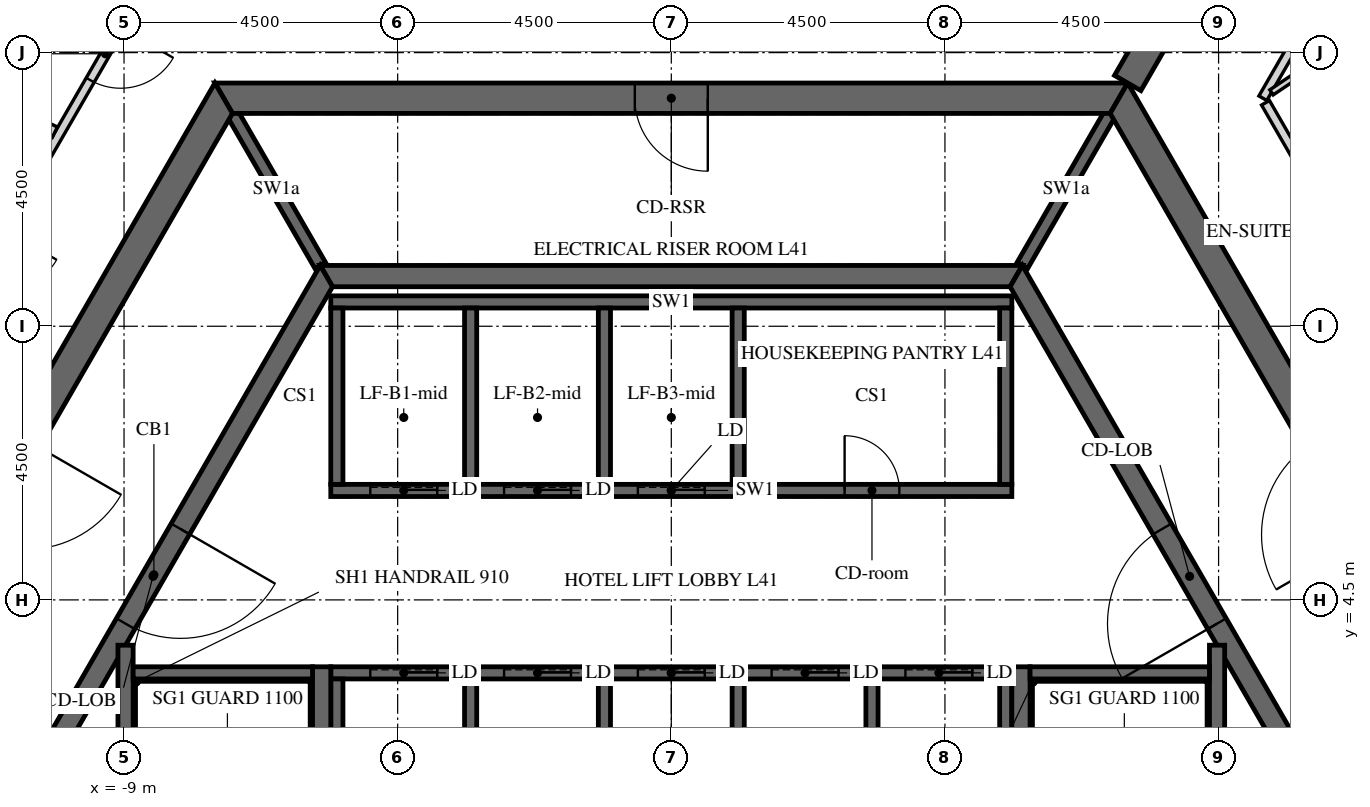
"""IFC4 building model, lengths in metres.
Left out: names, types, materials, properties, quantities, classifications, styles, units other than length and angle.
Written with IfcOpenShell. Run it as: python <this file> out.ifc"""

import sys

from ifc_helpers import new_model, si_unit, direction, frame, frame_2d, origin, place, context, subcontext, project, spatial, polyline, rectangle, outline, extrude, element, fill, save


model = new_model("IFC4")
c1 = context("Model", 3, precision=1e-05, world=origin(), true_north=direction((0.0, 1.0)))
c2 = subcontext(c1, "Body", "Model", "MODEL_VIEW")
j1 = project(units=[si_unit("LENGTHUNIT", "METRE"), si_unit("PLANEANGLEUNIT", "RADIAN")], contexts=[c1])
p1 = place(None, origin())
s1 = spatial("IfcSite", under=j1, at=p1, CompositionType="ELEMENT")
p2 = place(p1, origin())
s2 = spatial("IfcBuilding", under=s1, at=p2, CompositionType="ELEMENT")
p3 = place(p2, frame((0.0, 0.0, 176.1)))
s3 = spatial("IfcBuildingStorey", under=s2, at=p3, CompositionType="ELEMENT", Elevation=176.1)
p4 = place(p3, frame((-7.361, 12.75, -0.15), z_axis=(0.0, 0.0, 1.0), x_axis=(-0.50000571537, -0.866022103989, 0.0)))
e1 = element("IfcWall", 1, at=p4, inside=s3, PredefinedType="SHEAR", context=c2, shape_type="SweptSolid", body=[
    extrude(outline(polyline([(-0.144, -0.25), (14.867, -0.25), (14.578, 0.25), (0.144, 0.25), (-0.144, -0.25)])), origin(), (0.0, 0.0, 1.0), 3.9),
])
p5 = place(p4, frame((6.49, 0.0, 0.15)))
e2 = element("IfcOpeningElement", 2, at=p5, cuts=e1, PredefinedType="OPENING", context=c2, shape_type="SweptSolid", body=[
    extrude(rectangle(XDim=1.8, YDim=2.4, at=frame_2d((0.9, 1.2))), frame((0.0, 0.26, 0.0), z_axis=(0.0, -1.0, 0.0), x_axis=(1.0, 0.0, 0.0)), (0.0, 0.0, 1.0), 0.52),
])
p6 = place(p3, frame((14.722, 0.0, -0.15), z_axis=(0.0, 0.0, 1.0), x_axis=(-0.50000571537, 0.866022103989, 0.0)))
e3 = element("IfcWall", 3, at=p6, inside=s3, PredefinedType="SHEAR", context=c2, shape_type="SweptSolid", body=[
    extrude(outline(polyline([(-0.144, -0.25), (14.867, -0.25), (14.578, 0.25), (0.144, 0.25), (-0.144, -0.25)])), origin(), (0.0, 0.0, 1.0), 3.9),
])
p7 = place(p6, frame((6.432, 0.0, 0.15)))
e4 = element("IfcOpeningElement", 4, at=p7, cuts=e3, PredefinedType="OPENING", context=c2, shape_type="SweptSolid", body=[
    extrude(rectangle(XDim=1.8, YDim=2.4, at=frame_2d((0.9, 1.2))), frame((0.0, 0.26, 0.0), z_axis=(0.0, -1.0, 0.0), x_axis=(1.0, 0.0, 0.0)), (0.0, 0.0, 1.0), 0.52),
])
p8 = place(p3, frame((7.361, 12.75, -0.15), z_axis=(0.0, 0.0, 1.0), x_axis=(-1.0, 0.0, 0.0)))
e5 = element("IfcWall", 5, at=p8, inside=s3, PredefinedType="SHEAR", context=c2, shape_type="SweptSolid", body=[
    extrude(outline(polyline([(-0.144, -0.25), (14.866, -0.25), (14.578, 0.25), (0.144, 0.25), (-0.144, -0.25)])), origin(), (0.0, 0.0, 1.0), 3.9),
])
p9 = place(p8, frame((6.761, 0.0, 0.15)))
e6 = element("IfcOpeningElement", 6, at=p9, cuts=e5, PredefinedType="OPENING", context=c2, shape_type="SweptSolid", body=[
    extrude(rectangle(XDim=1.2, YDim=2.4, at=frame_2d((0.6, 1.2))), frame((0.0, 0.26, 0.0), z_axis=(0.0, -1.0, 0.0), x_axis=(1.0, 0.0, 0.0)), (0.0, 0.0, 1.0), 0.52),
])
p10 = place(p3, frame((7.506, 13.0, -0.15), z_axis=(0.0, 0.0, 1.0), x_axis=(0.499988271576, 0.866032175087, 0.0)))
e7 = element("IfcWall", 7, at=p10, inside=s3, PredefinedType="SHEAR", context=c2, shape_type="SweptSolid", body=[
    extrude(rectangle(XDim=15.424, YDim=0.5, at=frame_2d((7.712, 0.0))), origin(), (0.0, 0.0, 1.0), 3.9),
])
p11 = place(p10, frame((6.812, 0.0, 0.15)))
e8 = element("IfcOpeningElement", 8, at=p11, cuts=e7, PredefinedType="OPENING", context=c2, shape_type="SweptSolid", body=[
    extrude(rectangle(XDim=1.8, YDim=2.4, at=frame_2d((0.9, 1.2))), frame((0.0, 0.26, 0.0), z_axis=(0.0, -1.0, 0.0), x_axis=(1.0, 0.0, 0.0)), (0.0, 0.0, 1.0), 0.52),
])
p12 = place(p3, frame((-5.673, 9.825, -0.15), z_axis=(0.0, 0.0, 1.0), x_axis=(-0.499995046907, -0.866028263435, 0.0)))
e9 = element("IfcWall", 9, at=p12, inside=s3, PredefinedType="SHEAR", context=c2, shape_type="SweptSolid", body=[
    extrude(outline(polyline([(-0.101, -0.175), (11.446, -0.175), (11.244, 0.175), (0.101, 0.175), (-0.101, -0.175)])), origin(), (0.0, 0.0, 1.0), 3.9),
])
p13 = place(p12, frame((4.801, 0.0, 0.15)))
e10 = element("IfcOpeningElement", 10, at=p13, cuts=e9, PredefinedType="OPENING", context=c2, shape_type="SweptSolid", body=[
    extrude(rectangle(XDim=1.8, YDim=2.4, at=frame_2d((0.9, 1.2))), frame((0.0, 0.185, 0.0), z_axis=(0.0, -1.0, 0.0), x_axis=(1.0, 0.0, 0.0)), (0.0, 0.0, 1.0), 0.37),
])
p14 = place(p3, frame((11.345, 0.0, -0.15), z_axis=(0.0, 0.0, 1.0), x_axis=(-0.499995046907, 0.866028263435, 0.0)))
e11 = element("IfcWall", 11, at=p14, inside=s3, PredefinedType="SHEAR", context=c2, shape_type="SweptSolid", body=[
    extrude(outline(polyline([(-0.101, -0.175), (11.446, -0.175), (11.244, 0.175), (0.101, 0.175), (-0.101, -0.175)])), origin(), (0.0, 0.0, 1.0), 3.9),
])
p15 = place(p14, frame((4.744, 0.0, 0.15)))
e12 = element("IfcOpeningElement", 12, at=p15, cuts=e11, PredefinedType="OPENING", context=c2, shape_type="SweptSolid", body=[
    extrude(rectangle(XDim=1.8, YDim=2.4, at=frame_2d((0.9, 1.2))), frame((0.0, 0.185, 0.0), z_axis=(0.0, -1.0, 0.0), x_axis=(1.0, 0.0, 0.0)), (0.0, 0.0, 1.0), 0.37),
])
p16 = place(p3, frame((5.673, 9.825, -0.15), z_axis=(0.0, 0.0, 1.0), x_axis=(-1.0, 0.0, 0.0)))
e13 = element("IfcWall", 13, at=p16, inside=s3, PredefinedType="SHEAR", context=c2, shape_type="SweptSolid", body=[
    extrude(outline(polyline([(-0.101, -0.175), (11.446, -0.175), (11.244, 0.175), (0.101, 0.175), (-0.101, -0.175)])), origin(), (0.0, 0.0, 1.0), 3.9),
])
p17 = place(p3, frame((-5.6, 6.3, -0.25), z_axis=(0.0, 0.0, 1.0), x_axis=(1.0, 0.0, 0.0)))
e14 = element("IfcWall", 14, at=p17, inside=s3, PredefinedType="SHEAR", context=c2, shape_type="SweptSolid", body=[
    extrude(rectangle(XDim=11.2, YDim=0.2, at=frame_2d((5.6, 0.0))), origin(), (0.0, 0.0, 1.0), 3.9),
])
p18 = place(p17, frame((8.45, 0.0, 0.25)))
e15 = element("IfcOpeningElement", 15, at=p18, cuts=e14, PredefinedType="OPENING", context=c2, shape_type="SweptSolid", body=[
    extrude(rectangle(XDim=0.9, YDim=2.1, at=frame_2d((0.45, 1.05))), frame((0.0, 0.11, 0.0), z_axis=(0.0, -1.0, 0.0), x_axis=(1.0, 0.0, 0.0)), (0.0, 0.0, 1.0), 0.22),
])
p19 = place(p17, frame((0.65, 0.0, 0.25)))
e16 = element("IfcOpeningElement", 16, at=p19, cuts=e14, PredefinedType="OPENING", context=c2, shape_type="SweptSolid", body=[
    extrude(rectangle(XDim=1.1, YDim=2.1, at=frame_2d((0.55, 1.05))), frame((0.0, 0.11, 0.0), z_axis=(0.0, -1.0, 0.0), x_axis=(1.0, 0.0, 0.0)), (0.0, 0.0, 1.0), 0.22),
])
p20 = place(p17, frame((2.85, 0.0, 0.25)))
e17 = element("IfcOpeningElement", 17, at=p20, cuts=e14, PredefinedType="OPENING", context=c2, shape_type="SweptSolid", body=[
    extrude(rectangle(XDim=1.1, YDim=2.1, at=frame_2d((0.55, 1.05))), frame((0.0, 0.11, 0.0), z_axis=(0.0, -1.0, 0.0), x_axis=(1.0, 0.0, 0.0)), (0.0, 0.0, 1.0), 0.22),
])
p21 = place(p17, frame((5.05, 0.0, 0.25)))
e18 = element("IfcOpeningElement", 18, at=p21, cuts=e14, PredefinedType="OPENING", context=c2, shape_type="SweptSolid", body=[
    extrude(rectangle(XDim=1.1, YDim=2.1, at=frame_2d((0.55, 1.05))), frame((0.0, 0.11, 0.0), z_axis=(0.0, -1.0, 0.0), x_axis=(1.0, 0.0, 0.0)), (0.0, 0.0, 1.0), 0.22),
])
p22 = place(p3, frame((-5.6, 9.4, -0.25), z_axis=(0.0, 0.0, 1.0), x_axis=(1.0, 0.0, 0.0)))
e19 = element("IfcWall", 19, at=p22, inside=s3, PredefinedType="SHEAR", context=c2, shape_type="SweptSolid", body=[
    extrude(rectangle(XDim=11.2, YDim=0.2, at=frame_2d((5.6, 0.0))), origin(), (0.0, 0.0, 1.0), 3.9),
])
for number, where, z_axis, x_axis in (
    (20, (-5.5, 6.4, -0.25), (0.0, 0.0, 1.0), (0.0, 1.0, 0.0)),
    (21, (-3.3, 6.4, -0.25), (0.0, 0.0, 1.0), (0.0, 1.0, 0.0)),
    (22, (-1.1, 6.4, -0.25), (0.0, 0.0, 1.0), (0.0, 1.0, 0.0)),
    (23, (1.1, 6.4, -0.25), (0.0, 0.0, 1.0), (0.0, 1.0, 0.0)),
    (24, (5.5, 6.4, -0.25), (0.0, 0.0, 1.0), (0.0, 1.0, 0.0)),
):
    element("IfcWall", number, at=place(p3, frame(where, z_axis=z_axis, x_axis=x_axis)), inside=s3, PredefinedType="SHEAR", context=c2, shape_type="SweptSolid", body=[
        extrude(rectangle(XDim=2.9, YDim=0.2, at=frame_2d((1.45, 0.0))), origin(), (0.0, 0.0, 1.0), 3.9),
    ])
p23 = place(p3, frame((-5.6, 3.3, -0.25), z_axis=(0.0, 0.0, 1.0), x_axis=(1.0, 0.0, 0.0)))
e25 = element("IfcWall", 25, at=p23, inside=s3, PredefinedType="SHEAR", context=c2, shape_type="SweptSolid", body=[
    extrude(rectangle(XDim=11.2, YDim=0.2, at=frame_2d((5.6, 0.0))), origin(), (0.0, 0.0, 1.0), 3.9),
])
p24 = place(p23, frame((0.65, 0.0, 0.25)))
e26 = element("IfcOpeningElement", 26, at=p24, cuts=e25, PredefinedType="OPENING", context=c2, shape_type="SweptSolid", body=[
    extrude(rectangle(XDim=1.1, YDim=2.1, at=frame_2d((0.55, 1.05))), frame((0.0, 0.11, 0.0), z_axis=(0.0, -1.0, 0.0), x_axis=(1.0, 0.0, 0.0)), (0.0, 0.0, 1.0), 0.22),
])
p25 = place(p23, frame((2.85, 0.0, 0.25)))
e27 = element("IfcOpeningElement", 27, at=p25, cuts=e25, PredefinedType="OPENING", context=c2, shape_type="SweptSolid", body=[
    extrude(rectangle(XDim=1.1, YDim=2.1, at=frame_2d((0.55, 1.05))), frame((0.0, 0.11, 0.0), z_axis=(0.0, -1.0, 0.0), x_axis=(1.0, 0.0, 0.0)), (0.0, 0.0, 1.0), 0.22),
])
p26 = place(p23, frame((5.05, 0.0, 0.25)))
e28 = element("IfcOpeningElement", 28, at=p26, cuts=e25, PredefinedType="OPENING", context=c2, shape_type="SweptSolid", body=[
    extrude(rectangle(XDim=1.1, YDim=2.1, at=frame_2d((0.55, 1.05))), frame((0.0, 0.11, 0.0), z_axis=(0.0, -1.0, 0.0), x_axis=(1.0, 0.0, 0.0)), (0.0, 0.0, 1.0), 0.22),
])
p27 = place(p23, frame((7.25, 0.0, 0.25)))
e29 = element("IfcOpeningElement", 29, at=p27, cuts=e25, PredefinedType="OPENING", context=c2, shape_type="SweptSolid", body=[
    extrude(rectangle(XDim=1.1, YDim=2.1, at=frame_2d((0.55, 1.05))), frame((0.0, 0.11, 0.0), z_axis=(0.0, -1.0, 0.0), x_axis=(1.0, 0.0, 0.0)), (0.0, 0.0, 1.0), 0.22),
])
p28 = place(p23, frame((9.45, 0.0, 0.25)))
e30 = element("IfcOpeningElement", 30, at=p28, cuts=e25, PredefinedType="OPENING", context=c2, shape_type="SweptSolid", body=[
    extrude(rectangle(XDim=1.1, YDim=2.1, at=frame_2d((0.55, 1.05))), frame((0.0, 0.11, 0.0), z_axis=(0.0, -1.0, 0.0), x_axis=(1.0, 0.0, 0.0)), (0.0, 0.0, 1.0), 0.22),
])
for number, where, z_axis, x_axis in (
    (31, (-5.5, 0.1, -0.25), (0.0, 0.0, 1.0), (0.0, 1.0, 0.0)),
    (32, (-3.3, 0.1, -0.25), (0.0, 0.0, 1.0), (0.0, 1.0, 0.0)),
    (33, (-1.1, 0.1, -0.25), (0.0, 0.0, 1.0), (0.0, 1.0, 0.0)),
    (34, (1.1, 0.1, -0.25), (0.0, 0.0, 1.0), (0.0, 1.0, 0.0)),
    (35, (3.3, 0.1, -0.25), (0.0, 0.0, 1.0), (0.0, 1.0, 0.0)),
    (36, (5.5, 0.1, -0.25), (0.0, 0.0, 1.0), (0.0, 1.0, 0.0)),
):
    element("IfcWall", number, at=place(p3, frame(where, z_axis=z_axis, x_axis=x_axis)), inside=s3, PredefinedType="SHEAR", context=c2, shape_type="SweptSolid", body=[
        extrude(rectangle(XDim=3.1, YDim=0.2, at=frame_2d((1.55, 0.0))), origin(), (0.0, 0.0, 1.0), 3.9),
    ])
for number, where, z_axis, x_axis in (
    (37, (5.773, 10.0, -0.15), (0.0, 0.0, 1.0), (0.5, 0.866, 0.0)),
    (38, (-5.773, 10.0, -0.15), (0.0, 0.0, 1.0), (-0.5, 0.866, 0.0)),
):
    element("IfcWall", number, at=place(p3, frame(where, z_axis=z_axis, x_axis=x_axis)), inside=s3, PredefinedType="SHEAR", context=c2, shape_type="SweptSolid", body=[
        extrude(rectangle(XDim=2.887, YDim=0.2, at=frame_2d((1.443, 0.0))), origin(), (0.0, 0.0, 1.0), 3.9),
    ])
p29 = place(p3, frame((5.75, -3.4, -0.25), z_axis=(0.0, 0.0, 1.0), x_axis=(0.0, 1.0, 0.0)))
e39 = element("IfcWall", 39, at=p29, inside=s3, PredefinedType="SHEAR", context=c2, shape_type="SweptSolid", body=[
    extrude(rectangle(XDim=6.8, YDim=0.3, at=frame_2d((3.4, 0.0))), origin(), (0.0, 0.0, 1.0), 3.9),
])
p30 = place(p3, frame((8.975, -3.755, -0.25), z_axis=(0.0, 0.0, 1.0), x_axis=(0.0, 1.0, 0.0)))
e40 = element("IfcWall", 40, at=p30, inside=s3, PredefinedType="SHEAR", context=c2, shape_type="SweptSolid", body=[
    extrude(rectangle(XDim=7.51, YDim=0.25, at=frame_2d((3.755, 0.0))), origin(), (0.0, 0.0, 1.0), 3.9),
])
p31 = place(p3, frame((5.9, 3.3, -0.25), z_axis=(0.0, 0.0, 1.0), x_axis=(1.0, 0.0, 0.0)))
e41 = element("IfcWall", 41, at=p31, inside=s3, PredefinedType="SHEAR", context=c2, shape_type="SweptSolid", body=[
    extrude(rectangle(XDim=2.95, YDim=0.2, at=frame_2d((1.475, 0.0))), origin(), (0.0, 0.0, 1.0), 3.9),
])
p32 = place(p3, frame((-5.75, -3.4, -0.25), z_axis=(0.0, 0.0, 1.0), x_axis=(0.0, 1.0, 0.0)))
e42 = element("IfcWall", 42, at=p32, inside=s3, PredefinedType="SHEAR", context=c2, shape_type="SweptSolid", body=[
    extrude(rectangle(XDim=6.8, YDim=0.3, at=frame_2d((3.4, 0.0))), origin(), (0.0, 0.0, 1.0), 3.9),
])
p33 = place(p3, frame((-8.975, -3.755, -0.25), z_axis=(0.0, 0.0, 1.0), x_axis=(0.0, 1.0, 0.0)))
e43 = element("IfcWall", 43, at=p33, inside=s3, PredefinedType="SHEAR", context=c2, shape_type="SweptSolid", body=[
    extrude(rectangle(XDim=7.51, YDim=0.25, at=frame_2d((3.755, 0.0))), origin(), (0.0, 0.0, 1.0), 3.9),
])
p34 = place(p3, frame((-8.85, 3.3, -0.25), z_axis=(0.0, 0.0, 1.0), x_axis=(1.0, 0.0, 0.0)))
e44 = element("IfcWall", 44, at=p34, inside=s3, PredefinedType="SHEAR", context=c2, shape_type="SweptSolid", body=[
    extrude(rectangle(XDim=2.95, YDim=0.2, at=frame_2d((1.475, 0.0))), origin(), (0.0, 0.0, 1.0), 3.9),
])
p35 = place(p3, frame((-8.588, 14.725, 0.0), z_axis=(0.0, 0.0, 1.0), x_axis=(-0.499996322767, -0.866027526826, 0.0)))
e45 = element("IfcWall", 45, at=p35, inside=s3, PredefinedType="PARTITIONING", context=c2, shape_type="SweptSolid", body=[
    extrude(rectangle(XDim=14.636, YDim=0.15, at=frame_2d((7.318, 0.0))), origin(), (0.0, 0.0, 1.0), 2.988),
])
p36 = place(p35, frame((0.936, 0.0, 0.0)))
e46 = element("IfcOpeningElement", 46, at=p36, cuts=e45, PredefinedType="OPENING", context=c2, shape_type="SweptSolid", body=[
    extrude(rectangle(XDim=1.0, YDim=2.1, at=frame_2d((0.5, 1.05))), frame((0.0, 0.085, 0.0), z_axis=(0.0, -1.0, 0.0), x_axis=(1.0, 0.0, 0.0)), (0.0, 0.0, 1.0), 0.17),
])
p37 = place(p35, frame((4.771, 0.0, 0.0)))
e47 = element("IfcOpeningElement", 47, at=p37, cuts=e45, PredefinedType="OPENING", context=c2, shape_type="SweptSolid", body=[
    extrude(rectangle(XDim=1.0, YDim=2.1, at=frame_2d((0.5, 1.05))), frame((0.0, 0.085, 0.0), z_axis=(0.0, -1.0, 0.0), x_axis=(1.0, 0.0, 0.0)), (0.0, 0.0, 1.0), 0.17),
])
p38 = place(p35, frame((13.103, 0.0, 0.0)))
e48 = element("IfcOpeningElement", 48, at=p38, cuts=e45, PredefinedType="OPENING", context=c2, shape_type="SweptSolid", body=[
    extrude(rectangle(XDim=1.0, YDim=2.1, at=frame_2d((0.5, 1.05))), frame((0.0, 0.085, 0.0), z_axis=(0.0, -1.0, 0.0), x_axis=(1.0, 0.0, 0.0)), (0.0, 0.0, 1.0), 0.17),
])
p39 = place(p3, frame((17.046, 0.075, 0.0), z_axis=(0.0, 0.0, 1.0), x_axis=(-0.499999403554, 0.866025748143, 0.0)))
e49 = element("IfcWall", 49, at=p39, inside=s3, PredefinedType="PARTITIONING", context=c2, shape_type="SweptSolid", body=[
    extrude(rectangle(XDim=14.549, YDim=0.15, at=frame_2d((7.275, 0.0))), origin(), (0.0, 0.0, 1.0), 2.988),
])
p40 = place(p39, frame((6.901, 0.0, 0.0)))
e50 = element("IfcOpeningElement", 50, at=p40, cuts=e49, PredefinedType="OPENING", context=c2, shape_type="SweptSolid", body=[
    extrude(rectangle(XDim=1.0, YDim=2.1, at=frame_2d((0.5, 1.05))), frame((0.0, 0.085, 0.0), z_axis=(0.0, -1.0, 0.0), x_axis=(1.0, 0.0, 0.0)), (0.0, 0.0, 1.0), 0.17),
])
p41 = place(p3, frame((9.728, 12.75, 0.0), z_axis=(0.0, 0.0, 1.0), x_axis=(0.500007149838, 0.866021275784, 0.0)))
e51 = element("IfcWall", 51, at=p41, inside=s3, PredefinedType="PARTITIONING", context=c2, shape_type="SweptSolid", body=[
    extrude(rectangle(XDim=8.017, YDim=0.15, at=frame_2d((4.009, 0.0))), origin(), (0.0, 0.0, 1.0), 2.988),
])
p42 = place(p3, frame((-21.815, 17.892, 0.0), z_axis=(0.0, 0.0, 1.0), x_axis=(0.898798778742, -0.43836144371, 0.0)))
e52 = element("IfcWall", 52, at=p42, inside=s3, PredefinedType="PARTITIONING", context=c2, shape_type="SweptSolid", body=[
    extrude(rectangle(XDim=12.994, YDim=0.18, at=frame_2d((6.497, 0.0))), origin(), (0.0, 0.0, 1.0), 2.988),
])
p43 = place(p3, frame((9.87, 12.846, 0.0), z_axis=(0.0, 0.0, 1.0), x_axis=(0.829044958406, 0.559181953341, 0.0)))
e53 = element("IfcWall", 53, at=p43, inside=s3, PredefinedType="PARTITIONING", context=c2, shape_type="SweptSolid", body=[
    extrude(rectangle(XDim=2.422, YDim=0.1, at=frame_2d((1.211, 0.0))), origin(), (0.0, 0.0, 1.0), 2.988),
])
p44 = place(p9, origin())
e54 = element("IfcDoor", 54, at=p44, inside=s3, OperationType="SINGLE_SWING_LEFT", PredefinedType="DOOR", context=c2, shape_type="SweptSolid", body=[
    extrude(rectangle(XDim=1.2, YDim=2.4, at=frame_2d((0.6, 1.2))), frame((0.0, 0.025, 0.0), z_axis=(0.0, -1.0, 0.0), x_axis=(1.0, 0.0, 0.0)), (0.0, 0.0, 1.0), 0.05),
])
fill(e6, e54)
p45 = place(p13, origin())
e55 = element("IfcDoor", 55, at=p45, inside=s3, OperationType="DOUBLE_DOOR_SINGLE_SWING", PredefinedType="DOOR", context=c2, shape_type="SweptSolid", body=[
    extrude(rectangle(XDim=1.8, YDim=2.4, at=frame_2d((0.9, 1.2))), frame((0.0, 0.025, 0.0), z_axis=(0.0, -1.0, 0.0), x_axis=(1.0, 0.0, 0.0)), (0.0, 0.0, 1.0), 0.05),
])
fill(e10, e55)
p46 = place(p15, origin())
e56 = element("IfcDoor", 56, at=p46, inside=s3, OperationType="DOUBLE_DOOR_SINGLE_SWING", PredefinedType="DOOR", context=c2, shape_type="SweptSolid", body=[
    extrude(rectangle(XDim=1.8, YDim=2.4, at=frame_2d((0.9, 1.2))), frame((0.0, 0.025, 0.0), z_axis=(0.0, -1.0, 0.0), x_axis=(1.0, 0.0, 0.0)), (0.0, 0.0, 1.0), 0.05),
])
fill(e12, e56)
p47 = place(p18, origin())
e57 = element("IfcDoor", 57, at=p47, inside=s3, OperationType="SINGLE_SWING_LEFT", PredefinedType="DOOR", context=c2, shape_type="SweptSolid", body=[
    extrude(rectangle(XDim=0.9, YDim=2.1, at=frame_2d((0.45, 1.05))), frame((0.0, 0.025, 0.0), z_axis=(0.0, -1.0, 0.0), x_axis=(1.0, 0.0, 0.0)), (0.0, 0.0, 1.0), 0.05),
])
fill(e15, e57)
p48 = place(p19, origin())
e58 = element("IfcDoor", 58, at=p48, inside=s3, OperationType="SLIDING_TO_LEFT", PredefinedType="DOOR", context=c2, shape_type="SweptSolid", body=[
    extrude(rectangle(XDim=1.1, YDim=2.1, at=frame_2d((0.55, 1.05))), frame((0.0, 0.025, 0.0), z_axis=(0.0, -1.0, 0.0), x_axis=(1.0, 0.0, 0.0)), (0.0, 0.0, 1.0), 0.05),
])
fill(e16, e58)
p49 = place(p20, origin())
e59 = element("IfcDoor", 59, at=p49, inside=s3, OperationType="SLIDING_TO_LEFT", PredefinedType="DOOR", context=c2, shape_type="SweptSolid", body=[
    extrude(rectangle(XDim=1.1, YDim=2.1, at=frame_2d((0.55, 1.05))), frame((0.0, 0.025, 0.0), z_axis=(0.0, -1.0, 0.0), x_axis=(1.0, 0.0, 0.0)), (0.0, 0.0, 1.0), 0.05),
])
fill(e17, e59)
p50 = place(p21, origin())
e60 = element("IfcDoor", 60, at=p50, inside=s3, OperationType="SLIDING_TO_LEFT", PredefinedType="DOOR", context=c2, shape_type="SweptSolid", body=[
    extrude(rectangle(XDim=1.1, YDim=2.1, at=frame_2d((0.55, 1.05))), frame((0.0, 0.025, 0.0), z_axis=(0.0, -1.0, 0.0), x_axis=(1.0, 0.0, 0.0)), (0.0, 0.0, 1.0), 0.05),
])
fill(e18, e60)
p51 = place(p24, origin())
e61 = element("IfcDoor", 61, at=p51, inside=s3, OperationType="SLIDING_TO_LEFT", PredefinedType="DOOR", context=c2, shape_type="SweptSolid", body=[
    extrude(rectangle(XDim=1.1, YDim=2.1, at=frame_2d((0.55, 1.05))), frame((0.0, 0.025, 0.0), z_axis=(0.0, -1.0, 0.0), x_axis=(1.0, 0.0, 0.0)), (0.0, 0.0, 1.0), 0.05),
])
fill(e26, e61)
p52 = place(p25, origin())
e62 = element("IfcDoor", 62, at=p52, inside=s3, OperationType="SLIDING_TO_LEFT", PredefinedType="DOOR", context=c2, shape_type="SweptSolid", body=[
    extrude(rectangle(XDim=1.1, YDim=2.1, at=frame_2d((0.55, 1.05))), frame((0.0, 0.025, 0.0), z_axis=(0.0, -1.0, 0.0), x_axis=(1.0, 0.0, 0.0)), (0.0, 0.0, 1.0), 0.05),
])
fill(e27, e62)
p53 = place(p26, origin())
e63 = element("IfcDoor", 63, at=p53, inside=s3, OperationType="SLIDING_TO_LEFT", PredefinedType="DOOR", context=c2, shape_type="SweptSolid", body=[
    extrude(rectangle(XDim=1.1, YDim=2.1, at=frame_2d((0.55, 1.05))), frame((0.0, 0.025, 0.0), z_axis=(0.0, -1.0, 0.0), x_axis=(1.0, 0.0, 0.0)), (0.0, 0.0, 1.0), 0.05),
])
fill(e28, e63)
p54 = place(p27, origin())
e64 = element("IfcDoor", 64, at=p54, inside=s3, OperationType="SLIDING_TO_LEFT", PredefinedType="DOOR", context=c2, shape_type="SweptSolid", body=[
    extrude(rectangle(XDim=1.1, YDim=2.1, at=frame_2d((0.55, 1.05))), frame((0.0, 0.025, 0.0), z_axis=(0.0, -1.0, 0.0), x_axis=(1.0, 0.0, 0.0)), (0.0, 0.0, 1.0), 0.05),
])
fill(e29, e64)
p55 = place(p28, origin())
e65 = element("IfcDoor", 65, at=p55, inside=s3, OperationType="SLIDING_TO_LEFT", PredefinedType="DOOR", context=c2, shape_type="SweptSolid", body=[
    extrude(rectangle(XDim=1.1, YDim=2.1, at=frame_2d((0.55, 1.05))), frame((0.0, 0.025, 0.0), z_axis=(0.0, -1.0, 0.0), x_axis=(1.0, 0.0, 0.0)), (0.0, 0.0, 1.0), 0.05),
])
fill(e30, e65)
p56 = place(p36, origin())
e66 = element("IfcDoor", 66, at=p56, inside=s3, OperationType="SINGLE_SWING_RIGHT", PredefinedType="DOOR", context=c2, shape_type="SweptSolid", body=[
    extrude(rectangle(XDim=1.0, YDim=2.1, at=frame_2d((0.5, 1.05))), frame((0.0, 0.025, 0.0), z_axis=(0.0, -1.0, 0.0), x_axis=(1.0, 0.0, 0.0)), (0.0, 0.0, 1.0), 0.05),
])
fill(e46, e66)
save(model, sys.argv[1])
